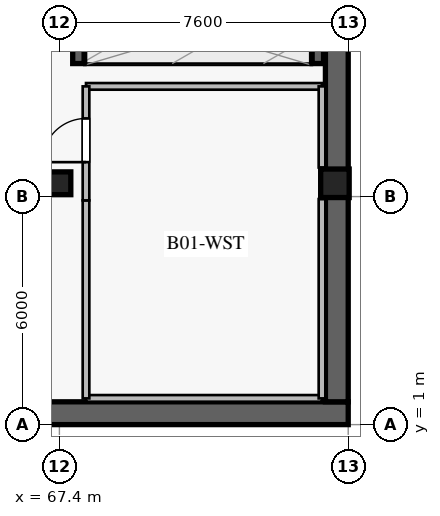
"""IFC4 building model, lengths in metres.
Left out: names, types, materials, properties, quantities, classifications, styles, units other than length and angle.
Written with IfcOpenShell. Run it as: python <this file> out.ifc"""

import sys

from ifc_helpers import new_model, si_unit, direction, frame, frame_2d, origin, origin_2d, place, context, subcontext, project, spatial, rectangle, extrude, element, fill, save


model = new_model("IFC4")
c1 = context("Model", 3, precision=1e-05, world=origin(), true_north=direction((0.0, 1.0)))
c2 = subcontext(c1, "Body", "Model", "MODEL_VIEW")
j1 = project(units=[si_unit("LENGTHUNIT", "METRE"), si_unit("PLANEANGLEUNIT", "RADIAN")], contexts=[c1])
p1 = place(None, origin())
s1 = spatial("IfcSite", under=j1, at=p1, CompositionType="ELEMENT")
p2 = place(p1, origin())
s2 = spatial("IfcBuilding", under=s1, at=p2, CompositionType="ELEMENT")
p3 = place(p2, frame((0.0, 0.0, -4.2)))
s3 = spatial("IfcBuildingStorey", under=s2, at=p3, CompositionType="ELEMENT", Elevation=-4.2)
for number, where, z_axis, x_axis in (
    (1, (67.9, 10.5, 0.0), (0.0, 0.0, 1.0), (0.0, 1.0, 0.0)),
    (2, (74.2, 10.5, 0.0), (0.0, 0.0, 1.0), (0.0, 1.0, 0.0)),
):
    element("IfcWall", number, at=place(p3, frame(where, z_axis=z_axis, x_axis=x_axis)), inside=s3, PredefinedType="SOLIDWALL", context=c2, shape_type="SweptSolid", body=[
        extrude(rectangle(XDim=28.5, YDim=0.3, at=frame_2d((14.25, 0.0))), origin(), (0.0, 0.0, 1.0), 3.88),
    ])
p4 = place(p3, frame((1.0, 1.3, 0.0), z_axis=(0.0, 0.0, 1.0), x_axis=(1.0, 0.0, 0.0)))
e3 = element("IfcWall", 3, at=p4, inside=s3, PredefinedType="USERDEFINED", context=c2, shape_type="SweptSolid", body=[
    extrude(rectangle(XDim=74.0, YDim=0.6, at=frame_2d((37.0, 0.0))), origin(), (0.0, 0.0, 1.0), 3.88),
])
p5 = place(p3, frame((74.7, 1.6, 0.0), z_axis=(0.0, 0.0, 1.0), x_axis=(0.0, 1.0, 0.0)))
e4 = element("IfcWall", 4, at=p5, inside=s3, PredefinedType="USERDEFINED", context=c2, shape_type="SweptSolid", body=[
    extrude(rectangle(XDim=46.8, YDim=0.6, at=frame_2d((23.4, 0.0))), origin(), (0.0, 0.0, 1.0), 3.88),
])
p6 = place(p3, frame((67.4, 7.35, 0.0), z_axis=(0.0, 0.0, 1.0), x_axis=(1.0, 0.0, 0.0)))
e5 = element("IfcColumn", 5, at=p6, inside=s3, PredefinedType="COLUMN", context=c2, shape_type="SweptSolid", body=[
    extrude(rectangle(XDim=0.6, YDim=0.6, at=origin_2d()), origin(), (0.0, 0.0, 1.0), 4.2),
])
p7 = place(p3, frame((74.65, 7.35, 0.0), z_axis=(0.0, 0.0, 1.0), x_axis=(1.0, 0.0, 0.0)))
e6 = element("IfcColumn", 6, at=p7, inside=s3, PredefinedType="COLUMN", context=c2, shape_type="SweptSolid", body=[
    extrude(rectangle(XDim=0.75, YDim=0.75, at=origin_2d()), origin(), (0.0, 0.0, 1.0), 4.2),
])
p8 = place(p3, frame((68.1, 9.9, 0.0), z_axis=(0.0, 0.0, 1.0), x_axis=(1.0, 0.0, 0.0)))
e7 = element("IfcWall", 7, at=p8, inside=s3, PredefinedType="PARTITIONING", context=c2, shape_type="SweptSolid", body=[
    extrude(rectangle(XDim=6.21, YDim=0.175, at=frame_2d((3.105, 0.0))), origin(), (0.0, 0.0, 1.0), 3.88),
])
p9 = place(p3, frame((68.1, 1.69, 0.0), z_axis=(0.0, 0.0, 1.0), x_axis=(1.0, 0.0, 0.0)))
e8 = element("IfcWall", 8, at=p9, inside=s3, PredefinedType="PARTITIONING", context=c2, shape_type="SweptSolid", body=[
    extrude(rectangle(XDim=6.21, YDim=0.175, at=frame_2d((3.105, 0.0))), origin(), (0.0, 0.0, 1.0), 3.15),
])
p10 = place(p3, frame((68.1, 1.69, 0.0), z_axis=(0.0, 0.0, 1.0), x_axis=(0.0, 1.0, 0.0)))
e9 = element("IfcWall", 9, at=p10, inside=s3, PredefinedType="PARTITIONING", context=c2, shape_type="SweptSolid", body=[
    extrude(rectangle(XDim=5.21, YDim=0.175, at=frame_2d((2.605, 0.0))), origin(), (0.0, 0.0, 1.0), 3.88),
])
p11 = place(p3, frame((74.31, 1.69, 0.0), z_axis=(0.0, 0.0, 1.0), x_axis=(0.0, 1.0, 0.0)))
e10 = element("IfcWall", 10, at=p11, inside=s3, PredefinedType="PARTITIONING", context=c2, shape_type="SweptSolid", body=[
    extrude(rectangle(XDim=5.245, YDim=0.175, at=frame_2d((2.623, 0.0))), origin(), (0.0, 0.0, 1.0), 3.15),
])
p12 = place(p3, frame((74.31, 7.765, 0.0), z_axis=(0.0, 0.0, 1.0), x_axis=(0.0, 1.0, 0.0)))
e11 = element("IfcWall", 11, at=p12, inside=s3, PredefinedType="PARTITIONING", context=c2, shape_type="SweptSolid", body=[
    extrude(rectangle(XDim=2.135, YDim=0.175, at=frame_2d((1.067, 0.0))), origin(), (0.0, 0.0, 1.0), 3.88),
])
p13 = place(p3, frame((68.1, 6.9, 0.0), z_axis=(0.0, 0.0, 1.0), x_axis=(0.0, 1.0, 0.0)))
e12 = element("IfcWall", 12, at=p13, inside=s3, PredefinedType="PARTITIONING", context=c2, shape_type="SweptSolid", body=[
    extrude(rectangle(XDim=3.0, YDim=0.175, at=frame_2d((1.5, 0.0))), origin(), (0.0, 0.0, 1.0), 3.52),
])
p14 = place(p13, frame((1.006, 0.0, 0.0)))
e13 = element("IfcOpeningElement", 13, at=p14, cuts=e12, PredefinedType="OPENING", context=c2, shape_type="SweptSolid", body=[
    extrude(rectangle(XDim=1.15, YDim=2.2, at=frame_2d((0.575, 1.1))), frame((0.0, 0.098, 0.0), z_axis=(0.0, -1.0, 0.0), x_axis=(1.0, 0.0, 0.0)), (0.0, 0.0, 1.0), 0.195),
])
p15 = place(p14, origin())
e14 = element("IfcDoor", 14, at=p15, inside=s3, OperationType="SINGLE_SWING_LEFT", PredefinedType="DOOR", context=c2, shape_type="SweptSolid", body=[
    extrude(rectangle(XDim=1.15, YDim=2.2, at=frame_2d((0.575, 1.1))), frame((0.0, 0.025, 0.0), z_axis=(0.0, -1.0, 0.0), x_axis=(1.0, 0.0, 0.0)), (0.0, 0.0, 1.0), 0.05),
])
fill(e13, e14)
save(model, sys.argv[1])
